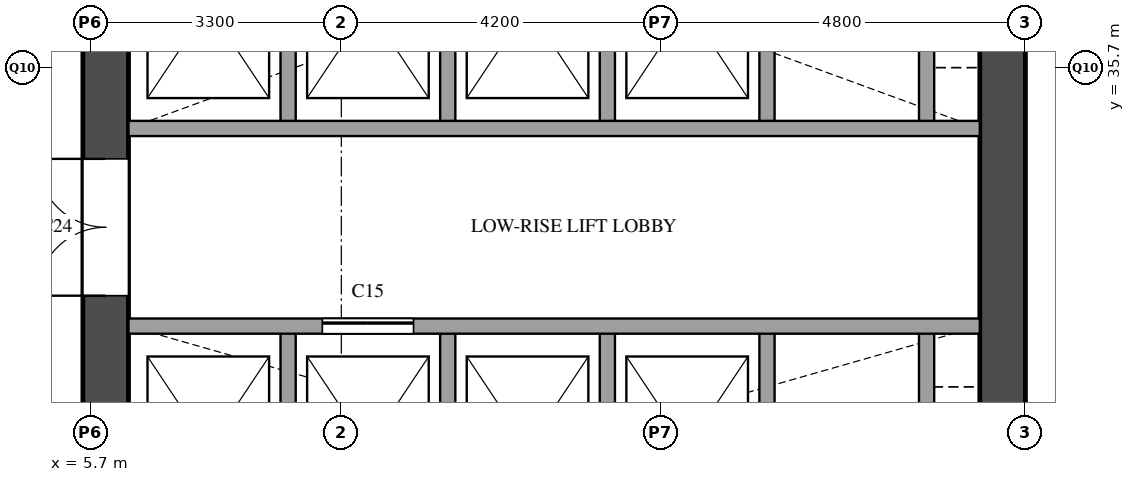
"""IFC4 building model, lengths in metres.
Left out: names, types, materials, properties, quantities, classifications, styles, units other than length and angle.
Written with IfcOpenShell. Run it as: python <this file> out.ifc"""

import sys

from ifc_helpers import new_model, si_unit, direction, frame, frame_2d, origin, place, context, subcontext, project, spatial, rectangle, extrude, element, fill, save


model = new_model("IFC4")
c1 = context("Model", 3, precision=1e-05, world=origin(), true_north=direction((0.0, 1.0)))
c2 = subcontext(c1, "Body", "Model", "MODEL_VIEW")
j1 = project(units=[si_unit("LENGTHUNIT", "METRE"), si_unit("PLANEANGLEUNIT", "RADIAN")], contexts=[c1])
p1 = place(None, origin())
s1 = spatial("IfcSite", under=j1, at=p1, CompositionType="ELEMENT")
p2 = place(p1, origin())
s2 = spatial("IfcBuilding", under=s1, at=p2, CompositionType="ELEMENT")
p3 = place(p2, frame((0.0, 0.0, 53.8)))
s3 = spatial("IfcBuildingStorey", under=s2, at=p3, CompositionType="ELEMENT", Elevation=53.8)
p4 = place(p3, frame((5.9, 29.1, 0.0), z_axis=(0.0, 0.0, 1.0), x_axis=(0.0, 1.0, 0.0)))
e1 = element("IfcWall", 1, at=p4, inside=s3, PredefinedType="SHEAR", context=c2, shape_type="SweptSolid", body=[
    extrude(rectangle(XDim=20.3, YDim=0.6, at=frame_2d((10.15, 0.0))), origin(), (0.0, 0.0, 1.0), 3.5),
])
p5 = place(p4, frame((3.6, 0.0, 0.0)))
e2 = element("IfcOpeningElement", 2, at=p5, cuts=e1, PredefinedType="OPENING", context=c2, shape_type="SweptSolid", body=[
    extrude(rectangle(XDim=1.8, YDim=2.1, at=frame_2d((0.9, 1.05))), frame((0.0, 0.31, 0.0), z_axis=(0.0, -1.0, 0.0), x_axis=(1.0, 0.0, 0.0)), (0.0, 0.0, 1.0), 0.62),
])
p6 = place(p4, frame((16.4, 0.0, 0.0)))
e3 = element("IfcOpeningElement", 3, at=p6, cuts=e1, PredefinedType="OPENING", context=c2, shape_type="SweptSolid", body=[
    extrude(rectangle(XDim=1.0, YDim=2.1, at=frame_2d((0.5, 1.05))), frame((0.0, 0.31, 0.0), z_axis=(0.0, -1.0, 0.0), x_axis=(1.0, 0.0, 0.0)), (0.0, 0.0, 1.0), 0.62),
])
p7 = place(p3, frame((17.7, 29.1, 0.0), z_axis=(0.0, 0.0, 1.0), x_axis=(0.0, 1.0, 0.0)))
e4 = element("IfcWall", 4, at=p7, inside=s3, PredefinedType="SHEAR", context=c2, shape_type="SweptSolid", body=[
    extrude(rectangle(XDim=20.3, YDim=0.6, at=frame_2d((10.15, 0.0))), origin(), (0.0, 0.0, 1.0), 3.5),
])
p8 = place(p7, frame((1.25, 0.0, 0.0)))
e5 = element("IfcOpeningElement", 5, at=p8, cuts=e4, PredefinedType="OPENING", context=c2, shape_type="SweptSolid", body=[
    extrude(rectangle(XDim=0.7, YDim=2.1, at=frame_2d((0.35, 1.05))), frame((0.0, 0.31, 0.0), z_axis=(0.0, -1.0, 0.0), x_axis=(1.0, 0.0, 0.0)), (0.0, 0.0, 1.0), 0.62),
])
p9 = place(p7, frame((7.05, 0.0, 0.0)))
e6 = element("IfcOpeningElement", 6, at=p9, cuts=e4, PredefinedType="OPENING", context=c2, shape_type="SweptSolid", body=[
    extrude(rectangle(XDim=0.7, YDim=2.1, at=frame_2d((0.35, 1.05))), frame((0.0, 0.31, 0.0), z_axis=(0.0, -1.0, 0.0), x_axis=(1.0, 0.0, 0.0)), (0.0, 0.0, 1.0), 0.62),
])
p10 = place(p3, frame((8.3, 29.1, 0.0), z_axis=(0.0, 0.0, 1.0), x_axis=(0.0, 1.0, 0.0)))
e7 = element("IfcWall", 7, at=p10, inside=s3, PredefinedType="SOLIDWALL", context=c2, shape_type="SweptSolid", body=[
    extrude(rectangle(XDim=3.2, YDim=0.2, at=frame_2d((1.6, 0.0))), origin(), (0.0, 0.0, 1.0), 3.5),
])
p11 = place(p3, frame((8.3, 34.9, 0.0), z_axis=(0.0, 0.0, 1.0), x_axis=(0.0, 1.0, 0.0)))
e8 = element("IfcWall", 8, at=p11, inside=s3, PredefinedType="SOLIDWALL", context=c2, shape_type="SweptSolid", body=[
    extrude(rectangle(XDim=3.2, YDim=0.2, at=frame_2d((1.6, 0.0))), origin(), (0.0, 0.0, 1.0), 3.5),
])
p12 = place(p3, frame((10.4, 29.1, 0.0), z_axis=(0.0, 0.0, 1.0), x_axis=(0.0, 1.0, 0.0)))
e9 = element("IfcWall", 9, at=p12, inside=s3, PredefinedType="SOLIDWALL", context=c2, shape_type="SweptSolid", body=[
    extrude(rectangle(XDim=3.2, YDim=0.2, at=frame_2d((1.6, 0.0))), origin(), (0.0, 0.0, 1.0), 3.5),
])
p13 = place(p3, frame((10.4, 34.9, 0.0), z_axis=(0.0, 0.0, 1.0), x_axis=(0.0, 1.0, 0.0)))
e10 = element("IfcWall", 10, at=p13, inside=s3, PredefinedType="SOLIDWALL", context=c2, shape_type="SweptSolid", body=[
    extrude(rectangle(XDim=3.2, YDim=0.2, at=frame_2d((1.6, 0.0))), origin(), (0.0, 0.0, 1.0), 3.5),
])
p14 = place(p3, frame((12.5, 29.1, 0.0), z_axis=(0.0, 0.0, 1.0), x_axis=(0.0, 1.0, 0.0)))
e11 = element("IfcWall", 11, at=p14, inside=s3, PredefinedType="SOLIDWALL", context=c2, shape_type="SweptSolid", body=[
    extrude(rectangle(XDim=3.2, YDim=0.2, at=frame_2d((1.6, 0.0))), origin(), (0.0, 0.0, 1.0), 3.5),
])
p15 = place(p3, frame((12.5, 34.9, 0.0), z_axis=(0.0, 0.0, 1.0), x_axis=(0.0, 1.0, 0.0)))
e12 = element("IfcWall", 12, at=p15, inside=s3, PredefinedType="SOLIDWALL", context=c2, shape_type="SweptSolid", body=[
    extrude(rectangle(XDim=3.2, YDim=0.2, at=frame_2d((1.6, 0.0))), origin(), (0.0, 0.0, 1.0), 3.5),
])
p16 = place(p3, frame((14.6, 29.1, 0.0), z_axis=(0.0, 0.0, 1.0), x_axis=(0.0, 1.0, 0.0)))
e13 = element("IfcWall", 13, at=p16, inside=s3, PredefinedType="SOLIDWALL", context=c2, shape_type="SweptSolid", body=[
    extrude(rectangle(XDim=3.2, YDim=0.2, at=frame_2d((1.6, 0.0))), origin(), (0.0, 0.0, 1.0), 3.5),
])
p17 = place(p3, frame((14.6, 34.9, 0.0), z_axis=(0.0, 0.0, 1.0), x_axis=(0.0, 1.0, 0.0)))
e14 = element("IfcWall", 14, at=p17, inside=s3, PredefinedType="SOLIDWALL", context=c2, shape_type="SweptSolid", body=[
    extrude(rectangle(XDim=3.2, YDim=0.2, at=frame_2d((1.6, 0.0))), origin(), (0.0, 0.0, 1.0), 3.5),
])
p18 = place(p3, frame((16.7, 29.1, 0.0), z_axis=(0.0, 0.0, 1.0), x_axis=(0.0, 1.0, 0.0)))
e15 = element("IfcWall", 15, at=p18, inside=s3, PredefinedType="SOLIDWALL", context=c2, shape_type="SweptSolid", body=[
    extrude(rectangle(XDim=3.2, YDim=0.2, at=frame_2d((1.6, 0.0))), origin(), (0.0, 0.0, 1.0), 3.5),
])
p19 = place(p3, frame((16.7, 34.9, 0.0), z_axis=(0.0, 0.0, 1.0), x_axis=(0.0, 1.0, 0.0)))
e16 = element("IfcWall", 16, at=p19, inside=s3, PredefinedType="SOLIDWALL", context=c2, shape_type="SweptSolid", body=[
    extrude(rectangle(XDim=3.2, YDim=0.2, at=frame_2d((1.6, 0.0))), origin(), (0.0, 0.0, 1.0), 3.5),
])
p20 = place(p3, frame((6.2, 32.3, 0.0), z_axis=(0.0, 0.0, 1.0), x_axis=(1.0, 0.0, 0.0)))
e17 = element("IfcWall", 17, at=p20, inside=s3, PredefinedType="SOLIDWALL", context=c2, shape_type="SweptSolid", body=[
    extrude(rectangle(XDim=11.2, YDim=0.2, at=frame_2d((5.6, 0.0))), origin(), (0.0, 0.0, 1.0), 3.5),
])
p21 = place(p20, frame((2.55, 0.0, 0.0)))
e18 = element("IfcOpeningElement", 18, at=p21, cuts=e17, PredefinedType="OPENING", context=c2, shape_type="SweptSolid", body=[
    extrude(rectangle(XDim=1.2, YDim=2.1, at=frame_2d((0.6, 1.05))), frame((0.0, 0.11, 0.0), z_axis=(0.0, -1.0, 0.0), x_axis=(1.0, 0.0, 0.0)), (0.0, 0.0, 1.0), 0.22),
])
p22 = place(p3, frame((6.2, 34.9, 0.0), z_axis=(0.0, 0.0, 1.0), x_axis=(1.0, 0.0, 0.0)))
e19 = element("IfcWall", 19, at=p22, inside=s3, PredefinedType="SOLIDWALL", context=c2, shape_type="SweptSolid", body=[
    extrude(rectangle(XDim=11.2, YDim=0.2, at=frame_2d((5.6, 0.0))), origin(), (0.0, 0.0, 1.0), 3.5),
])
p23 = place(p21, origin())
e20 = element("IfcDoor", 20, at=p23, inside=s3, OperationType="SLIDING_TO_LEFT", PredefinedType="DOOR", context=c2, shape_type="SweptSolid", body=[
    extrude(rectangle(XDim=1.2, YDim=2.1, at=frame_2d((0.6, 1.05))), frame((0.0, 0.025, 0.0), z_axis=(0.0, -1.0, 0.0), x_axis=(1.0, 0.0, 0.0)), (0.0, 0.0, 1.0), 0.05),
])
fill(e18, e20)
p24 = place(p5, origin())
e21 = element("IfcDoor", 21, at=p24, inside=s3, OperationType="DOUBLE_DOOR_SINGLE_SWING", PredefinedType="DOOR", context=c2, shape_type="SweptSolid", body=[
    extrude(rectangle(XDim=1.8, YDim=2.1, at=frame_2d((0.9, 1.05))), frame((0.0, 0.025, 0.0), z_axis=(0.0, -1.0, 0.0), x_axis=(1.0, 0.0, 0.0)), (0.0, 0.0, 1.0), 0.05),
])
fill(e2, e21)
save(model, sys.argv[1])
